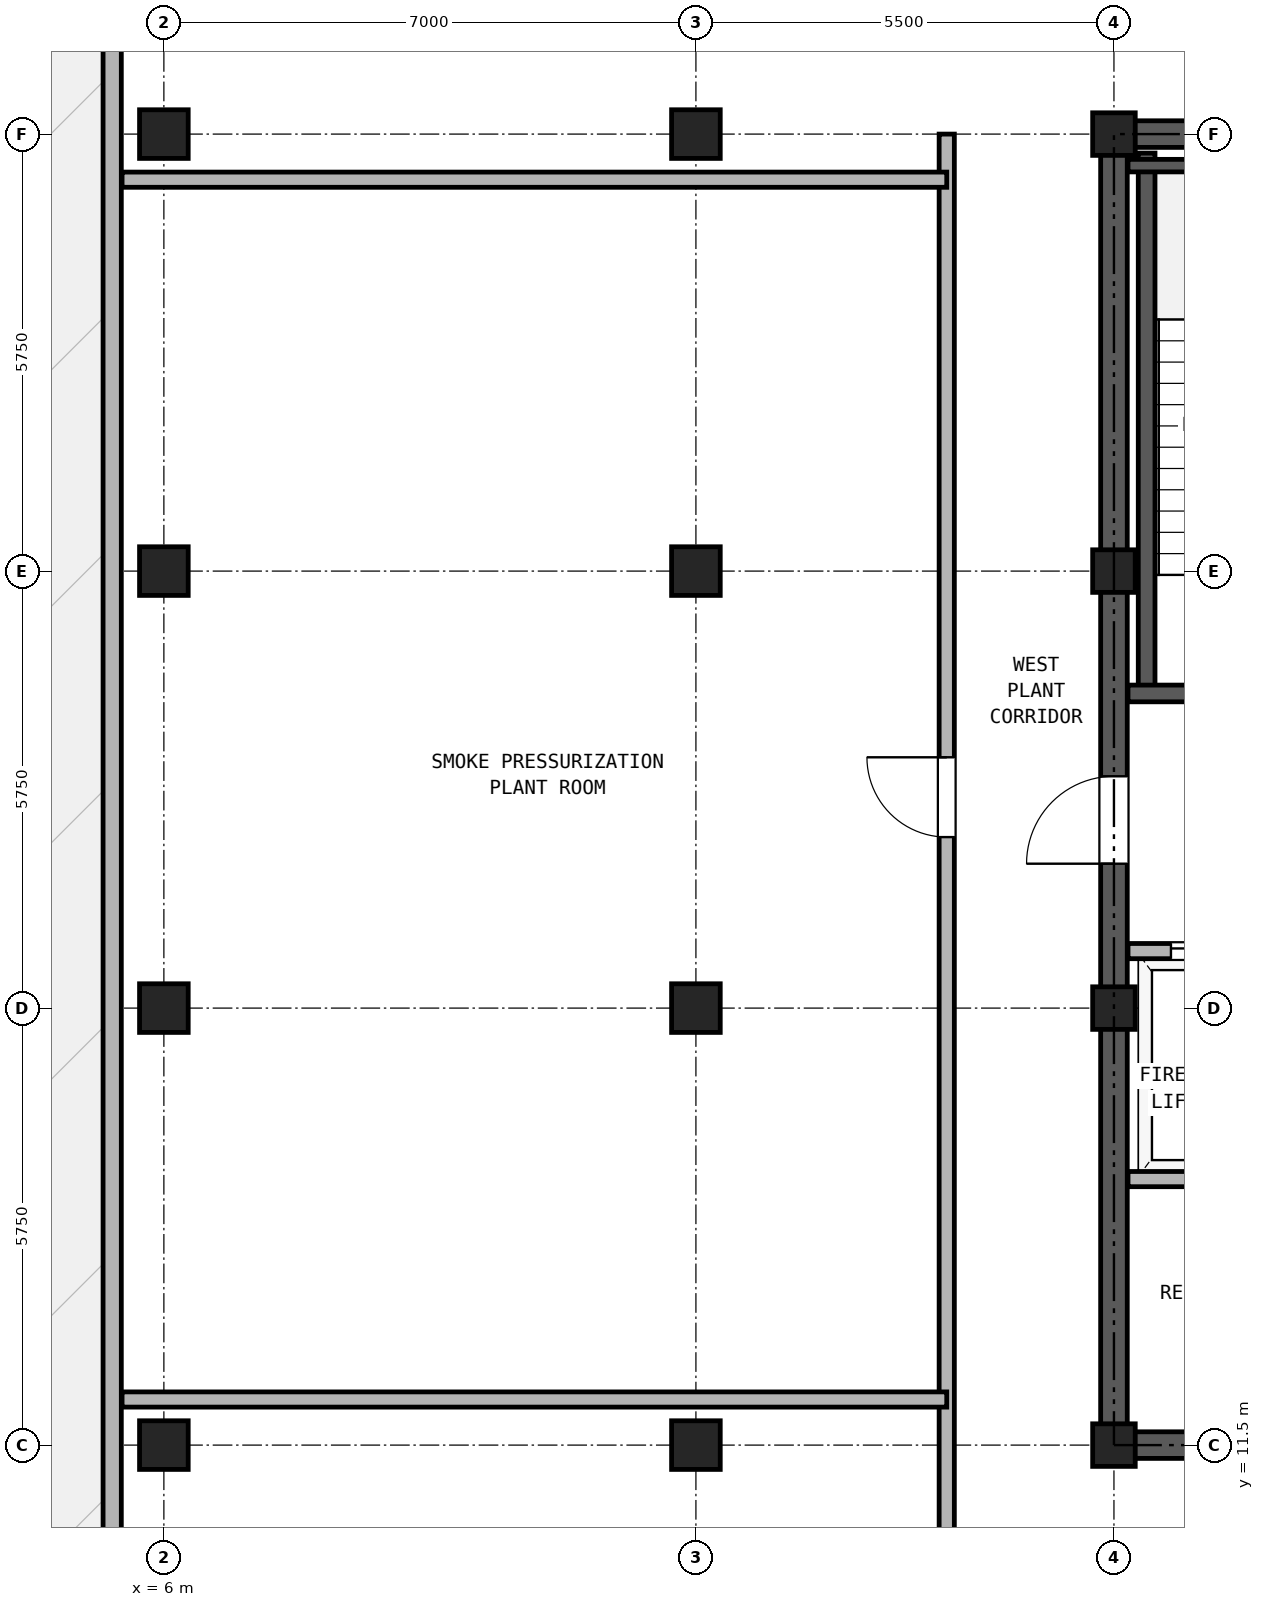
"""IFC4 building model, lengths in metres.
Left out: names, types, materials, properties, quantities, classifications, styles, units other than length and angle.
Written with IfcOpenShell. Run it as: python <this file> out.ifc"""

import sys

from ifc_helpers import new_model, si_unit, direction, frame, frame_2d, origin, origin_2d, place, context, subcontext, project, spatial, rectangle, hollow_rectangle, extrude, source, transform, mapped, element, fill, save


model = new_model("IFC4")
c1 = context("Model", 3, precision=1e-05, world=origin(), true_north=direction((0.0, 1.0)))
c2 = subcontext(c1, "Body", "Model", "MODEL_VIEW")
j1 = project(units=[si_unit("LENGTHUNIT", "METRE"), si_unit("PLANEANGLEUNIT", "RADIAN")], contexts=[c1])
p1 = place(None, origin())
s1 = spatial("IfcSite", under=j1, at=p1, CompositionType="ELEMENT")
p2 = place(p1, origin())
s2 = spatial("IfcBuilding", under=s1, at=p2, CompositionType="ELEMENT")
p3 = place(p2, frame((0.0, 0.0, 215.6)))
s3 = spatial("IfcBuildingStorey", under=s2, at=p3, CompositionType="ELEMENT", Elevation=215.6)
m1 = source(origin(), c2, "Body", "SweptSolid", [
    extrude(hollow_rectangle(XDim=0.64, YDim=0.64, WallThickness=0.035, at=origin_2d()), origin(), (0.0, 0.0, 1.0), 4.28),
])
for number, where, z_axis, x_axis in (
    (1, (6.0, 11.5, 0.0), (0.0, 0.0, 1.0), (1.0, 0.0, 0.0)),
    (2, (6.0, 17.25, 0.0), (0.0, 0.0, 1.0), (1.0, 0.0, 0.0)),
    (3, (6.0, 23.0, 0.0), (0.0, 0.0, 1.0), (1.0, 0.0, 0.0)),
    (4, (6.0, 28.75, 0.0), (0.0, 0.0, 1.0), (1.0, 0.0, 0.0)),
    (5, (13.0, 11.5, 0.0), (0.0, 0.0, 1.0), (1.0, 0.0, 0.0)),
    (6, (13.0, 17.25, 0.0), (0.0, 0.0, 1.0), (1.0, 0.0, 0.0)),
    (7, (13.0, 23.0, 0.0), (0.0, 0.0, 1.0), (1.0, 0.0, 0.0)),
    (8, (13.0, 28.75, 0.0), (0.0, 0.0, 1.0), (1.0, 0.0, 0.0)),
):
    element("IfcColumn", number, at=place(p3, frame(where, z_axis=z_axis, x_axis=x_axis)), inside=s3, PredefinedType="COLUMN", context=c2, shape_type="MappedRepresentation", body=[
        mapped(m1, transform((0.0, 0.0, 0.0), x_axis=(1.0, 0.0, 0.0), y_axis=(0.0, 1.0, 0.0), z_axis=(0.0, 0.0, 1.0), scale=1.0)),
    ])
m2 = source(origin(), c2, "Body", "SweptSolid", [
    extrude(hollow_rectangle(XDim=0.56, YDim=0.56, WallThickness=0.03, at=origin_2d()), origin(), (0.0, 0.0, 1.0), 4.28),
])
for number, where, z_axis, x_axis in (
    (9, (18.5, 11.5, 0.0), (0.0, 0.0, 1.0), (1.0, 0.0, 0.0)),
    (10, (18.5, 17.25, 0.0), (0.0, 0.0, 1.0), (1.0, 0.0, 0.0)),
    (11, (18.5, 23.0, 0.0), (0.0, 0.0, 1.0), (1.0, 0.0, 0.0)),
    (12, (18.5, 28.75, 0.0), (0.0, 0.0, 1.0), (1.0, 0.0, 0.0)),
):
    element("IfcColumn", number, at=place(p3, frame(where, z_axis=z_axis, x_axis=x_axis)), inside=s3, PredefinedType="COLUMN", context=c2, shape_type="MappedRepresentation", body=[
        mapped(m2, transform((0.0, 0.0, 0.0), x_axis=(1.0, 0.0, 0.0), y_axis=(0.0, 1.0, 0.0), z_axis=(0.0, 0.0, 1.0), scale=1.0)),
    ])
p4 = place(p3, frame((5.32, 31.8, 0.0), z_axis=(0.0, 0.0, 1.0), x_axis=(0.0, -1.0, 0.0)))
e13 = element("IfcWall", 13, at=p4, inside=s3, PredefinedType="SOLIDWALL", context=c2, shape_type="SweptSolid", body=[
    extrude(rectangle(XDim=28.3, YDim=0.24, at=frame_2d((14.15, 0.0))), origin(), (0.0, 0.0, 1.0), 4.28),
])
p5 = place(p3, frame((18.325, 11.5, 0.0), z_axis=(0.0, 0.0, 1.0), x_axis=(1.0, 0.0, 0.0)))
e14 = element("IfcWall", 14, at=p5, inside=s3, PredefinedType="SHEAR", context=c2, shape_type="SweptSolid", body=[
    extrude(rectangle(XDim=10.35, YDim=0.35, at=frame_2d((5.175, 0.0))), origin(), (0.0, 0.0, 1.0), 4.28),
])
p6 = place(p5, frame((1.775, 0.0, 0.0)))
e15 = element("IfcOpeningElement", 15, at=p6, cuts=e14, PredefinedType="OPENING", context=c2, shape_type="SweptSolid", body=[
    extrude(rectangle(XDim=0.95, YDim=2.15, at=frame_2d((0.475, 1.075))), frame((0.0, 0.185, 0.0), z_axis=(0.0, -1.0, 0.0), x_axis=(1.0, 0.0, 0.0)), (0.0, 0.0, 1.0), 0.37),
])
p7 = place(p5, frame((5.275, 0.0, 0.0)))
e16 = element("IfcOpeningElement", 16, at=p7, cuts=e14, PredefinedType="OPENING", context=c2, shape_type="SweptSolid", body=[
    extrude(rectangle(XDim=0.95, YDim=2.15, at=frame_2d((0.475, 1.075))), frame((0.0, 0.185, 0.0), z_axis=(0.0, -1.0, 0.0), x_axis=(1.0, 0.0, 0.0)), (0.0, 0.0, 1.0), 0.37),
])
p8 = place(p5, frame((8.175, 0.0, 0.0)))
e17 = element("IfcOpeningElement", 17, at=p8, cuts=e14, PredefinedType="OPENING", context=c2, shape_type="SweptSolid", body=[
    extrude(rectangle(XDim=1.1, YDim=2.25, at=frame_2d((0.55, 1.125))), frame((0.0, 0.185, 0.0), z_axis=(0.0, -1.0, 0.0), x_axis=(1.0, 0.0, 0.0)), (0.0, 0.0, 1.0), 0.37),
])
p9 = place(p3, frame((18.325, 28.75, 0.0), z_axis=(0.0, 0.0, 1.0), x_axis=(1.0, 0.0, 0.0)))
e18 = element("IfcWall", 18, at=p9, inside=s3, PredefinedType="SHEAR", context=c2, shape_type="SweptSolid", body=[
    extrude(rectangle(XDim=10.35, YDim=0.35, at=frame_2d((5.175, 0.0))), origin(), (0.0, 0.0, 1.0), 4.28),
])
p10 = place(p9, frame((4.055, 0.0, 0.0)))
e19 = element("IfcOpeningElement", 19, at=p10, cuts=e18, PredefinedType="OPENING", context=c2, shape_type="SweptSolid", body=[
    extrude(rectangle(XDim=0.9, YDim=2.05, at=frame_2d((0.45, 1.025))), frame((0.0, 0.185, 0.0), z_axis=(0.0, -1.0, 0.0), x_axis=(1.0, 0.0, 0.0)), (0.0, 0.0, 1.0), 0.37),
])
p11 = place(p9, frame((5.595, 0.0, 0.0)))
e20 = element("IfcOpeningElement", 20, at=p11, cuts=e18, PredefinedType="OPENING", context=c2, shape_type="SweptSolid", body=[
    extrude(rectangle(XDim=0.9, YDim=2.05, at=frame_2d((0.45, 1.025))), frame((0.0, 0.185, 0.0), z_axis=(0.0, -1.0, 0.0), x_axis=(1.0, 0.0, 0.0)), (0.0, 0.0, 1.0), 0.37),
])
p12 = place(p3, frame((18.5, 11.675, 0.0), z_axis=(0.0, 0.0, 1.0), x_axis=(0.0, 1.0, 0.0)))
e21 = element("IfcWall", 21, at=p12, inside=s3, PredefinedType="SHEAR", context=c2, shape_type="SweptSolid", body=[
    extrude(rectangle(XDim=16.9, YDim=0.35, at=frame_2d((8.45, 0.0))), origin(), (0.0, 0.0, 1.0), 4.28),
])
p13 = place(p12, frame((7.475, 0.0, 0.0)))
e22 = element("IfcOpeningElement", 22, at=p13, cuts=e21, PredefinedType="OPENING", context=c2, shape_type="SweptSolid", body=[
    extrude(rectangle(XDim=1.15, YDim=2.2, at=frame_2d((0.575, 1.1))), frame((0.0, 0.185, 0.0), z_axis=(0.0, -1.0, 0.0), x_axis=(1.0, 0.0, 0.0)), (0.0, 0.0, 1.0), 0.37),
])
p14 = place(p3, frame((18.93, 21.39, 0.0), z_axis=(0.0, 0.0, 1.0), x_axis=(0.0, 1.0, 0.0)))
e23 = element("IfcWall", 23, at=p14, inside=s3, PredefinedType="SOLIDWALL", context=c2, shape_type="SweptSolid", body=[
    extrude(rectangle(XDim=7.11, YDim=0.22, at=frame_2d((3.555, 0.0))), origin(), (0.0, 0.0, 1.0), 4.28),
])
p15 = place(p3, frame((18.685, 28.335, 0.0), z_axis=(0.0, 0.0, 1.0), x_axis=(1.0, 0.0, 0.0)))
e24 = element("IfcWall", 24, at=p15, inside=s3, PredefinedType="PARTITIONING", context=c2, shape_type="SweptSolid", body=[
    extrude(rectangle(XDim=3.425, YDim=0.165, at=frame_2d((1.712, 0.0))), origin(), (0.0, 0.0, 1.0), 4.28),
])
p16 = place(p3, frame((18.685, 21.39, 0.0), z_axis=(0.0, 0.0, 1.0), x_axis=(1.0, 0.0, 0.0)))
e25 = element("IfcWall", 25, at=p16, inside=s3, PredefinedType="SOLIDWALL", context=c2, shape_type="SweptSolid", body=[
    extrude(rectangle(XDim=6.445, YDim=0.22, at=frame_2d((3.222, 0.0))), origin(), (0.0, 0.0, 1.0), 4.28),
])
p17 = place(p16, frame((1.165, 0.0, 0.0)))
e26 = element("IfcOpeningElement", 26, at=p17, cuts=e25, PredefinedType="OPENING", context=c2, shape_type="SweptSolid", body=[
    extrude(rectangle(XDim=1.15, YDim=2.2, at=frame_2d((0.575, 1.1))), frame((0.0, 0.12, 0.0), z_axis=(0.0, -1.0, 0.0), x_axis=(1.0, 0.0, 0.0)), (0.0, 0.0, 1.0), 0.24),
])
p18 = place(p16, frame((4.895, 0.0, 0.0)))
e27 = element("IfcOpeningElement", 27, at=p18, cuts=e25, PredefinedType="OPENING", context=c2, shape_type="SweptSolid", body=[
    extrude(rectangle(XDim=1.1, YDim=2.25, at=frame_2d((0.55, 1.125))), frame((0.0, 0.12, 0.0), z_axis=(0.0, -1.0, 0.0), x_axis=(1.0, 0.0, 0.0)), (0.0, 0.0, 1.0), 0.24),
])
p19 = place(p3, frame((18.685, 18.0, 0.0), z_axis=(0.0, 0.0, 1.0), x_axis=(1.0, 0.0, 0.0)))
e28 = element("IfcWall", 28, at=p19, inside=s3, PredefinedType="PARTITIONING", context=c2, shape_type="SweptSolid", body=[
    extrude(rectangle(XDim=9.63, YDim=0.2, at=frame_2d((4.815, 0.0))), origin(), (0.0, 0.0, 1.0), 4.28),
])
p20 = place(p19, frame((0.565, 0.0, 0.0)))
e29 = element("IfcOpeningElement", 29, at=p20, cuts=e28, PredefinedType="OPENING", context=c2, shape_type="SweptSolid", body=[
    extrude(rectangle(XDim=1.3, YDim=2.3, at=frame_2d((0.65, 1.15))), frame((0.0, 0.11, 0.0), z_axis=(0.0, -1.0, 0.0), x_axis=(1.0, 0.0, 0.0)), (0.0, 0.0, 1.0), 0.22),
])
p21 = place(p19, frame((2.665, 0.0, 0.0)))
e30 = element("IfcOpeningElement", 30, at=p21, cuts=e28, PredefinedType="OPENING", context=c2, shape_type="SweptSolid", body=[
    extrude(rectangle(XDim=1.3, YDim=2.3, at=frame_2d((0.65, 1.15))), frame((0.0, 0.11, 0.0), z_axis=(0.0, -1.0, 0.0), x_axis=(1.0, 0.0, 0.0)), (0.0, 0.0, 1.0), 0.22),
])
p22 = place(p19, frame((7.165, 0.0, 0.0)))
e31 = element("IfcOpeningElement", 31, at=p22, cuts=e28, PredefinedType="OPENING", context=c2, shape_type="SweptSolid", body=[
    extrude(rectangle(XDim=1.0, YDim=2.15, at=frame_2d((0.5, 1.075))), frame((0.0, 0.11, 0.0), z_axis=(0.0, -1.0, 0.0), x_axis=(1.0, 0.0, 0.0)), (0.0, 0.0, 1.0), 0.22),
])
p23 = place(p3, frame((18.685, 15.0, 0.0), z_axis=(0.0, 0.0, 1.0), x_axis=(1.0, 0.0, 0.0)))
e32 = element("IfcWall", 32, at=p23, inside=s3, PredefinedType="PARTITIONING", context=c2, shape_type="SweptSolid", body=[
    extrude(rectangle(XDim=9.63, YDim=0.2, at=frame_2d((4.815, 0.0))), origin(), (0.0, 0.0, 1.0), 4.28),
])
p24 = place(p3, frame((16.3, 8.9, 0.0), z_axis=(0.0, 0.0, 1.0), x_axis=(0.0, 1.0, 0.0)))
e33 = element("IfcWall", 33, at=p24, inside=s3, PredefinedType="PARTITIONING", context=c2, shape_type="SweptSolid", body=[
    extrude(rectangle(XDim=19.85, YDim=0.2, at=frame_2d((9.925, 0.0))), origin(), (0.0, 0.0, 1.0), 4.28),
])
p25 = place(p24, frame((10.6, 0.0, 0.0)))
e34 = element("IfcOpeningElement", 34, at=p25, cuts=e33, PredefinedType="OPENING", context=c2, shape_type="SweptSolid", body=[
    extrude(rectangle(XDim=1.05, YDim=2.15, at=frame_2d((0.525, 1.075))), frame((0.0, 0.11, 0.0), z_axis=(0.0, -1.0, 0.0), x_axis=(1.0, 0.0, 0.0)), (0.0, 0.0, 1.0), 0.22),
])
for number, where, z_axis, x_axis in (
    (35, (5.45, 12.1, 0.0), (0.0, 0.0, 1.0), (1.0, 0.0, 0.0)),
    (36, (5.45, 28.15, 0.0), (0.0, 0.0, 1.0), (1.0, 0.0, 0.0)),
):
    element("IfcWall", number, at=place(p3, frame(where, z_axis=z_axis, x_axis=x_axis)), inside=s3, PredefinedType="PARTITIONING", context=c2, shape_type="SweptSolid", body=[
        extrude(rectangle(XDim=10.85, YDim=0.2, at=frame_2d((5.425, 0.0))), origin(), (0.0, 0.0, 1.0), 4.28),
    ])
p26 = place(p20, origin())
e37 = element("IfcDoor", 37, at=p26, inside=s3, OperationType="DOUBLE_DOOR_SLIDING", PredefinedType="DOOR", context=c2, shape_type="SweptSolid", body=[
    extrude(rectangle(XDim=1.3, YDim=2.3, at=frame_2d((0.65, 1.15))), frame((0.0, 0.025, 0.0), z_axis=(0.0, -1.0, 0.0), x_axis=(1.0, 0.0, 0.0)), (0.0, 0.0, 1.0), 0.05),
])
fill(e29, e37)
p27 = place(p13, frame((1.15, 0.0, 0.0), z_axis=(0.0, 0.0, 1.0), x_axis=(-1.0, 0.0, 0.0)))
e38 = element("IfcDoor", 38, at=p27, inside=s3, OperationType="SINGLE_SWING_LEFT", PredefinedType="DOOR", context=c2, shape_type="SweptSolid", body=[
    extrude(rectangle(XDim=1.15, YDim=2.2, at=frame_2d((0.575, 1.1))), frame((0.0, 0.025, 0.0), z_axis=(0.0, -1.0, 0.0), x_axis=(1.0, 0.0, 0.0)), (0.0, 0.0, 1.0), 0.05),
])
fill(e22, e38)
p28 = place(p25, frame((1.05, 0.0, 0.0), z_axis=(0.0, 0.0, 1.0), x_axis=(-1.0, 0.0, 0.0)))
e39 = element("IfcDoor", 39, at=p28, inside=s3, OperationType="SINGLE_SWING_RIGHT", PredefinedType="DOOR", context=c2, shape_type="SweptSolid", body=[
    extrude(rectangle(XDim=1.05, YDim=2.15, at=frame_2d((0.525, 1.075))), frame((0.0, 0.025, 0.0), z_axis=(0.0, -1.0, 0.0), x_axis=(1.0, 0.0, 0.0)), (0.0, 0.0, 1.0), 0.05),
])
fill(e34, e39)
save(model, sys.argv[1])
